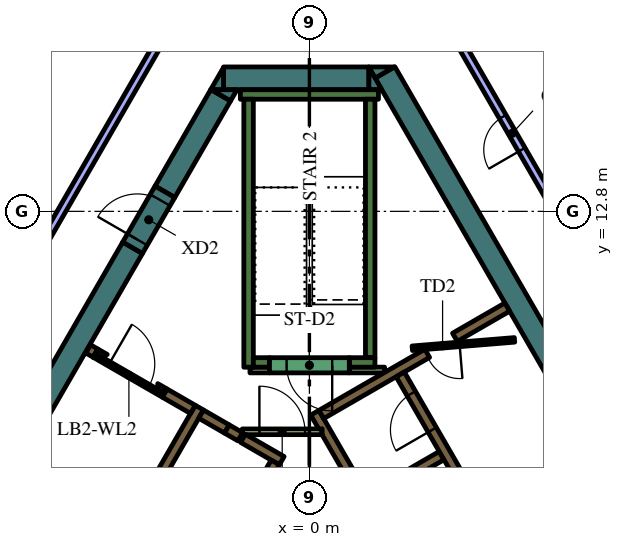
"""IFC4 building model, lengths in metres.
Left out: names, types, materials, properties, quantities, classifications, styles, units other than length and angle.
Written with IfcOpenShell. Run it as: python <this file> out.ifc"""

import sys

from ifc_helpers import new_model, si_unit, direction, frame, frame_2d, origin, place, context, subcontext, project, spatial, polyline, rectangle, outline, extrude, element, fill, save


model = new_model("IFC4")
c1 = context("Model", 3, precision=1e-05, world=origin(), true_north=direction((0.0, 1.0)))
c2 = subcontext(c1, "Body", "Model", "MODEL_VIEW")
j1 = project(units=[si_unit("LENGTHUNIT", "METRE"), si_unit("PLANEANGLEUNIT", "RADIAN")], contexts=[c1])
p1 = place(None, origin())
s1 = spatial("IfcSite", under=j1, at=p1, CompositionType="ELEMENT")
p2 = place(p1, origin())
s2 = spatial("IfcBuilding", under=s1, at=p2, CompositionType="ELEMENT")
p3 = place(p2, frame((0.0, 0.0, 292.2)))
s3 = spatial("IfcBuildingStorey", under=s2, at=p3, CompositionType="ELEMENT", Elevation=292.2)
p4 = place(p3, frame((1.989, 16.456, 0.0), z_axis=(0.0, 0.0, 1.0), x_axis=(0.49999102663, -0.8660305845, 0.0)))
e1 = element("IfcWall", 1, at=p4, inside=s3, PredefinedType="SOLIDWALL", context=c2, shape_type="SweptSolid", body=[
    extrude(rectangle(XDim=12.406, YDim=0.6, at=frame_2d((6.203, 0.0))), origin(), (0.0, 0.0, 1.0), 4.2),
])
p5 = place(p3, origin())
e2 = element("IfcWall", 2, at=p5, inside=s3, PredefinedType="SOLIDWALL", context=c2, shape_type="SweptSolid", body=[
    extrude(outline(polyline([(1.559, 16.6), (2.235, 16.6), (1.728, 16.307), (1.559, 16.6)])), origin(), (0.0, 0.0, 1.0), 4.2),
])
p6 = place(p3, frame((-2.258, 16.3, 0.0), z_axis=(0.0, 0.0, 1.0), x_axis=(1.0, 0.0, 0.0)))
e3 = element("IfcWall", 3, at=p6, inside=s3, PredefinedType="SOLIDWALL", context=c2, shape_type="SweptSolid", body=[
    extrude(rectangle(XDim=3.823, YDim=0.6, at=frame_2d((1.912, 0.0))), origin(), (0.0, 0.0, 1.0), 4.2),
])
e4 = element("IfcWall", 4, at=p5, inside=s3, PredefinedType="SOLIDWALL", context=c2, shape_type="SweptSolid", body=[
    extrude(outline(polyline([(1.905, 16.0), (1.567, 16.0), (1.567, 16.585), (1.905, 16.0)])), origin(), (0.0, 0.0, 1.0), 4.2),
])
e5 = element("IfcWall", 5, at=p5, inside=s3, PredefinedType="SOLIDWALL", context=c2, shape_type="SweptSolid", body=[
    extrude(outline(polyline([(-2.598, 16.0), (-2.26, 16.585), (-2.26, 16.0), (-2.598, 16.0)])), origin(), (0.0, 0.0, 1.0), 4.2),
])
p7 = place(p3, frame((-2.335, 15.855, 0.0), z_axis=(0.0, 0.0, 1.0), x_axis=(-0.499960127962, -0.866048422692, 0.0)))
e6 = element("IfcWall", 6, at=p7, inside=s3, PredefinedType="SOLIDWALL", context=c2, shape_type="SweptSolid", body=[
    extrude(rectangle(XDim=2.934, YDim=0.6, at=frame_2d((1.467, 0.0))), origin(), (0.0, 0.0, 1.0), 4.2),
])
e7 = element("IfcWall", 7, at=p5, inside=s3, PredefinedType="SOLIDWALL", context=c2, shape_type="SweptSolid", body=[
    extrude(outline(polyline([(-1.905, 16.0), (-2.074, 15.707), (-2.581, 16.0), (-1.905, 16.0)])), origin(), (0.0, 0.0, 1.0), 4.2),
])
e8 = element("IfcWall", 8, at=p5, inside=s3, PredefinedType="SOLIDWALL", context=c2, shape_type="SweptSolid", body=[
    extrude(outline(polyline([(-15.502, -6.35), (-4.912, 11.992), (-4.393, 11.692), (-10.815, 0.569), (-10.84, 0.583), (-10.84, 0.583), (-10.84, 0.583), (-10.965, 0.367), (-10.965, 0.367), (-10.965, 0.367), (-10.94, 0.352), (-11.033, 0.191), (-14.809, -6.35), (-15.156, -6.95), (-15.502, -6.35)])), origin(), (0.0, 0.0, 1.0), 4.2),
])
p8 = place(p3, frame((-1.817, 15.875, 0.0), z_axis=(0.0, 0.0, 1.0), x_axis=(1.0, 0.0, 0.0)))
e9 = element("IfcWall", 9, at=p8, inside=s3, PredefinedType="SOLIDWALL", context=c2, shape_type="SweptSolid", body=[
    extrude(rectangle(XDim=3.634, YDim=0.25, at=frame_2d((1.817, 0.0))), origin(), (0.0, 0.0, 1.0), 4.2),
])
p9 = place(p3, frame((1.6, 8.95, 0.0), z_axis=(0.0, 0.0, 1.0), x_axis=(0.0, 1.0, 0.0)))
e10 = element("IfcWall", 10, at=p9, inside=s3, PredefinedType="SOLIDWALL", context=c2, shape_type="SweptSolid", body=[
    extrude(rectangle(XDim=6.8, YDim=0.25, at=frame_2d((3.4, 0.0))), origin(), (0.0, 0.0, 1.0), 4.2),
])
p10 = place(p3, frame((1.05, 8.825, 0.0), z_axis=(0.0, 0.0, 1.0), x_axis=(1.0, 0.0, 0.0)))
e11 = element("IfcWall", 11, at=p10, inside=s3, PredefinedType="SOLIDWALL", context=c2, shape_type="SweptSolid", body=[
    extrude(rectangle(XDim=0.675, YDim=0.25, at=frame_2d((0.337, 0.0))), origin(), (0.0, 0.0, 1.0), 4.2),
])
p11 = place(p3, frame((-1.6, 8.7, 0.0), z_axis=(0.0, 0.0, 1.0), x_axis=(0.0, 1.0, 0.0)))
e12 = element("IfcWall", 12, at=p11, inside=s3, PredefinedType="SOLIDWALL", context=c2, shape_type="SweptSolid", body=[
    extrude(rectangle(XDim=7.05, YDim=0.25, at=frame_2d((3.525, 0.0))), origin(), (0.0, 0.0, 1.0), 4.2),
])
p12 = place(p3, frame((-1.475, 8.825, 0.0), z_axis=(0.0, 0.0, 1.0), x_axis=(1.0, 0.0, 0.0)))
e13 = element("IfcWall", 13, at=p12, inside=s3, PredefinedType="SOLIDWALL", context=c2, shape_type="SweptSolid", body=[
    extrude(rectangle(XDim=0.425, YDim=0.25, at=frame_2d((0.212, 0.0))), origin(), (0.0, 0.0, 1.0), 4.2),
])
e14 = element("IfcWall", 14, at=p5, inside=s3, PredefinedType="SOLIDWALL", context=c2, shape_type="SweptSolid", body=[
    extrude(outline(polyline([(0.332, 6.925), (0.335, 6.925), (0.335, 6.925), (0.335, 6.925), (0.335, 7.075), (0.335, 7.075), (0.335, 7.075), (0.245, 7.075), (0.035, 7.439), (0.252, 7.564), (0.377, 7.348), (1.512, 5.382), (1.637, 5.165), (2.221, 4.153), (2.771, 3.199), (2.896, 2.983), (3.138, 2.564), (4.031, 1.017), (4.156, 0.801), (5.292, -1.165), (5.417, -1.382), (6.073, -2.519), (6.552, -3.348), (6.677, -3.564), (6.46, -3.689), (0.332, 6.925)])), origin(), (0.0, 0.0, 1.0), 4.2),
])
p13 = place(p3, frame((3.1, 9.064, 0.0), z_axis=(0.0, 0.0, 1.0), x_axis=(-0.866030133475, -0.499991807846, 0.0)))
e15 = element("IfcWall", 15, at=p13, inside=s3, PredefinedType="SOLIDWALL", context=c2, shape_type="SweptSolid", body=[
    extrude(rectangle(XDim=3.217, YDim=0.25, at=frame_2d((1.608, 0.0))), origin(), (0.0, 0.0, 1.0), 4.2),
])
p14 = place(p3, frame((1.574, 5.274, 0.0), z_axis=(0.0, 0.0, 1.0), x_axis=(0.866028486751, 0.499994660107, 0.0)))
e16 = element("IfcWall", 16, at=p14, inside=s3, PredefinedType="SOLIDWALL", context=c2, shape_type="SweptSolid", body=[
    extrude(rectangle(XDim=2.2, YDim=0.25, at=frame_2d((1.1, 0.0))), origin(), (0.0, 0.0, 1.0), 4.2),
])
p15 = place(p3, frame((3.83, 9.486, 0.0), z_axis=(0.0, 0.0, 1.0), x_axis=(0.865986202621, 0.500067892261, 0.0)))
e17 = element("IfcWall", 17, at=p15, inside=s3, PredefinedType="SOLIDWALL", context=c2, shape_type="SweptSolid", body=[
    extrude(rectangle(XDim=1.591, YDim=0.25, at=frame_2d((0.795, 0.0))), origin(), (0.0, 0.0, 1.0), 4.2),
])
p16 = place(p3, frame((-8.06, -1.311, 0.0), z_axis=(0.0, 0.0, 1.0), x_axis=(0.50000273126, 0.866023826885, 0.0)))
e18 = element("IfcWall", 18, at=p16, inside=s3, PredefinedType="SOLIDWALL", context=c2, shape_type="SweptSolid", body=[
    extrude(rectangle(XDim=10.33, YDim=0.25, at=frame_2d((5.165, 0.0))), origin(), (0.0, 0.0, 1.0), 4.2),
])
p17 = place(p3, frame((-1.819, 6.87, 0.0), z_axis=(0.0, 0.0, 1.0), x_axis=(-0.866294599386, 0.499533449405, 0.0)))
e19 = element("IfcWall", 19, at=p17, inside=s3, PredefinedType="SOLIDWALL", context=c2, shape_type="SweptSolid", body=[
    extrude(rectangle(XDim=0.41, YDim=0.25, at=frame_2d((0.205, 0.0))), origin(), (0.0, 0.0, 1.0), 4.2),
])
p18 = place(p3, frame((-2.849, 7.465, 0.0), z_axis=(0.0, 0.0, 1.0), x_axis=(0.865955664968, -0.500120771724, 0.0)))
e20 = element("IfcWall", 20, at=p18, inside=s3, PredefinedType="SOLIDWALL", context=c2, shape_type="SweptSolid", body=[
    extrude(rectangle(XDim=0.778, YDim=0.25, at=frame_2d((0.389, 0.0))), origin(), (0.0, 0.0, 1.0), 4.2),
])
p19 = place(p3, frame((-0.728, 6.24, 0.0), z_axis=(0.0, 0.0, 1.0), x_axis=(-0.866002680491, 0.500039355833, 0.0)))
e21 = element("IfcWall", 21, at=p19, inside=s3, PredefinedType="SOLIDWALL", context=c2, shape_type="SweptSolid", body=[
    extrude(rectangle(XDim=1.178, YDim=0.25, at=frame_2d((0.589, 0.0))), origin(), (0.0, 0.0, 1.0), 4.2),
])
p20 = place(p3, frame((-5.629, 9.07, 0.0), z_axis=(0.0, 0.0, 1.0), x_axis=(-0.866185586049, 0.49972245349, 0.0)))
e22 = element("IfcWall", 22, at=p20, inside=s3, PredefinedType="SOLIDWALL", context=c2, shape_type="SweptSolid", body=[
    extrude(rectangle(XDim=0.22, YDim=0.25, at=frame_2d((0.11, 0.0))), origin(), (0.0, 0.0, 1.0), 4.2),
])
p21 = place(p3, frame((-3.809, 8.019, 0.0), z_axis=(0.0, 0.0, 1.0), x_axis=(0.866010229787, -0.500026281214, 0.0)))
e23 = element("IfcWall", 23, at=p21, inside=s3, PredefinedType="SOLIDWALL", context=c2, shape_type="SweptSolid", body=[
    extrude(rectangle(XDim=0.858, YDim=0.25, at=frame_2d((0.429, 0.0))), origin(), (0.0, 0.0, 1.0), 4.2),
])
e24 = element("IfcWall", 24, at=p5, inside=s3, PredefinedType="SOLIDWALL", context=c2, shape_type="SweptSolid", body=[
    extrude(outline(polyline([(-3.748, 8.128), (-3.813, 8.015), (-4.027, 8.139), (-4.017, 8.156), (-4.008, 8.173), (-4.0, 8.192), (-3.995, 8.21), (-3.991, 8.23), (-3.99, 8.25), (-3.99, 8.268), (-3.748, 8.128)])), origin(), (0.0, 0.0, 1.0), 4.2),
])
e25 = element("IfcWall", 25, at=p5, inside=s3, PredefinedType="SOLIDWALL", context=c2, shape_type="SweptSolid", body=[
    extrude(outline(polyline([(-5.689, 8.96), (-5.69, 8.961), (-5.565, 9.177), (-5.319, 9.035), (-5.335, 9.026), (-5.351, 9.015), (-5.366, 9.002), (-5.379, 8.988), (-5.392, 8.972), (-5.402, 8.956), (-5.412, 8.939), (-5.629, 9.064), (-5.629, 9.064), (-5.689, 8.96)])), origin(), (0.0, 0.0, 1.0), 4.2),
])
p22 = place(p3, frame((1.05, 8.625, 0.0), z_axis=(0.0, 0.0, 1.0), x_axis=(1.0, 0.0, 0.0)))
e26 = element("IfcWall", 26, at=p22, inside=s3, PredefinedType="PARTITIONING", context=c2, shape_type="SweptSolid", body=[
    extrude(rectangle(XDim=0.929, YDim=0.15, at=frame_2d((0.464, 0.0))), origin(), (0.0, 0.0, 1.0), 3.55),
])
p23 = place(p3, frame((-1.564, 8.625, 0.0), z_axis=(0.0, 0.0, 1.0), x_axis=(1.0, 0.0, 0.0)))
e27 = element("IfcWall", 27, at=p23, inside=s3, PredefinedType="PARTITIONING", context=c2, shape_type="SweptSolid", body=[
    extrude(rectangle(XDim=0.514, YDim=0.15, at=frame_2d((0.257, 0.0))), origin(), (0.0, 0.0, 1.0), 3.55),
])
p24 = place(p3, frame((8.565, -2.185, 0.0), z_axis=(0.0, 0.0, 1.0), x_axis=(-0.499997954832, 0.866026584559, 0.0)))
e28 = element("IfcWall", 28, at=p24, inside=s3, PredefinedType="SOLIDWALL", context=c2, shape_type="SweptSolid", body=[
    extrude(rectangle(XDim=12.35, YDim=0.25, at=frame_2d((6.175, 0.0))), origin(), (0.0, 0.0, 1.0), 4.2),
])
p25 = place(p24, frame((0.685, 0.0, 0.0)))
e29 = element("IfcOpeningElement", 29, at=p25, cuts=e28, PredefinedType="OPENING", context=c2, shape_type="SweptSolid", body=[
    extrude(rectangle(XDim=0.9, YDim=2.1, at=frame_2d((0.45, 1.05))), frame((0.0, 0.135, 0.0), z_axis=(0.0, -1.0, 0.0), x_axis=(1.0, 0.0, 0.0)), (0.0, 0.0, 1.0), 0.27),
])
p26 = place(p24, frame((3.105, 0.0, 0.0)))
e30 = element("IfcOpeningElement", 30, at=p26, cuts=e28, PredefinedType="OPENING", context=c2, shape_type="SweptSolid", body=[
    extrude(rectangle(XDim=1.1, YDim=2.1, at=frame_2d((0.55, 1.05))), frame((0.0, 0.135, 0.0), z_axis=(0.0, -1.0, 0.0), x_axis=(1.0, 0.0, 0.0)), (0.0, 0.0, 1.0), 0.27),
])
p27 = place(p24, frame((5.625, 0.0, 0.0)))
e31 = element("IfcOpeningElement", 31, at=p27, cuts=e28, PredefinedType="OPENING", context=c2, shape_type="SweptSolid", body=[
    extrude(rectangle(XDim=1.1, YDim=2.1, at=frame_2d((0.55, 1.05))), frame((0.0, 0.135, 0.0), z_axis=(0.0, -1.0, 0.0), x_axis=(1.0, 0.0, 0.0)), (0.0, 0.0, 1.0), 0.27),
])
p28 = place(p24, frame((8.145, 0.0, 0.0)))
e32 = element("IfcOpeningElement", 32, at=p28, cuts=e28, PredefinedType="OPENING", context=c2, shape_type="SweptSolid", body=[
    extrude(rectangle(XDim=1.1, YDim=2.1, at=frame_2d((0.55, 1.05))), frame((0.0, 0.135, 0.0), z_axis=(0.0, -1.0, 0.0), x_axis=(1.0, 0.0, 0.0)), (0.0, 0.0, 1.0), 0.27),
])
p29 = place(p24, frame((10.665, 0.0, 0.0)))
e33 = element("IfcOpeningElement", 33, at=p29, cuts=e28, PredefinedType="OPENING", context=c2, shape_type="SweptSolid", body=[
    extrude(rectangle(XDim=1.1, YDim=2.1, at=frame_2d((0.55, 1.05))), frame((0.0, 0.135, 0.0), z_axis=(0.0, -1.0, 0.0), x_axis=(1.0, 0.0, 0.0)), (0.0, 0.0, 1.0), 0.27),
])
p30 = place(p3, frame((-0.898, 6.194, 0.0), z_axis=(0.0, 0.0, 1.0), x_axis=(-0.499996202215, -0.866027596426, 0.0)))
e34 = element("IfcWall", 34, at=p30, inside=s3, PredefinedType="SOLIDWALL", context=c2, shape_type="SweptSolid", body=[
    extrude(rectangle(XDim=9.83, YDim=0.25, at=frame_2d((4.915, 0.0))), origin(), (0.0, 0.0, 1.0), 4.2),
])
p31 = place(p30, frame((0.585, 0.0, 0.0)))
e35 = element("IfcOpeningElement", 35, at=p31, cuts=e34, PredefinedType="OPENING", context=c2, shape_type="SweptSolid", body=[
    extrude(rectangle(XDim=1.1, YDim=2.1, at=frame_2d((0.55, 1.05))), frame((0.0, 0.135, 0.0), z_axis=(0.0, -1.0, 0.0), x_axis=(1.0, 0.0, 0.0)), (0.0, 0.0, 1.0), 0.27),
])
p32 = place(p30, frame((3.105, 0.0, 0.0)))
e36 = element("IfcOpeningElement", 36, at=p32, cuts=e34, PredefinedType="OPENING", context=c2, shape_type="SweptSolid", body=[
    extrude(rectangle(XDim=1.1, YDim=2.1, at=frame_2d((0.55, 1.05))), frame((0.0, 0.135, 0.0), z_axis=(0.0, -1.0, 0.0), x_axis=(1.0, 0.0, 0.0)), (0.0, 0.0, 1.0), 0.27),
])
p33 = place(p30, frame((5.625, 0.0, 0.0)))
e37 = element("IfcOpeningElement", 37, at=p33, cuts=e34, PredefinedType="OPENING", context=c2, shape_type="SweptSolid", body=[
    extrude(rectangle(XDim=1.1, YDim=2.1, at=frame_2d((0.55, 1.05))), frame((0.0, 0.135, 0.0), z_axis=(0.0, -1.0, 0.0), x_axis=(1.0, 0.0, 0.0)), (0.0, 0.0, 1.0), 0.27),
])
p34 = place(p30, frame((8.145, 0.0, 0.0)))
e38 = element("IfcOpeningElement", 38, at=p34, cuts=e34, PredefinedType="OPENING", context=c2, shape_type="SweptSolid", body=[
    extrude(rectangle(XDim=1.1, YDim=2.1, at=frame_2d((0.55, 1.05))), frame((0.0, 0.135, 0.0), z_axis=(0.0, -1.0, 0.0), x_axis=(1.0, 0.0, 0.0)), (0.0, 0.0, 1.0), 0.27),
])
p35 = place(p3, frame((1.05, 8.75, 0.0), z_axis=(0.0, 0.0, 1.0), x_axis=(-1.0, 0.0, 0.0)))
e39 = element("IfcWall", 39, at=p35, inside=s3, PredefinedType="SOLIDWALL", context=c2, shape_type="SweptSolid", body=[
    extrude(rectangle(XDim=2.1, YDim=0.4, at=frame_2d((1.05, 0.0))), origin(), (0.0, 0.0, 1.0), 4.2),
])
p36 = place(p35, frame((0.45, 0.0, 0.0)))
e40 = element("IfcOpeningElement", 40, at=p36, cuts=e39, PredefinedType="OPENING", context=c2, shape_type="SweptSolid", body=[
    extrude(rectangle(XDim=1.2, YDim=2.1, at=frame_2d((0.6, 1.05))), frame((0.0, 0.21, 0.0), z_axis=(0.0, -1.0, 0.0), x_axis=(1.0, 0.0, 0.0)), (0.0, 0.0, 1.0), 0.42),
])
p37 = place(p3, frame((5.398, 9.419, 0.0), z_axis=(0.0, 0.0, 1.0), x_axis=(-0.996653416376, -0.081743303248, 0.0)))
e41 = element("IfcWall", 41, at=p37, inside=s3, PredefinedType="PARTITIONING", context=c2, shape_type="SweptSolid", body=[
    extrude(rectangle(XDim=2.7, YDim=0.12, at=frame_2d((1.35, 0.0))), origin(), (0.0, 0.0, 1.0), 3.55),
])
p38 = place(p37, frame((1.45, 0.0, 0.0)))
e42 = element("IfcOpeningElement", 42, at=p38, cuts=e41, PredefinedType="OPENING", context=c2, shape_type="SweptSolid", body=[
    extrude(rectangle(XDim=0.9, YDim=2.1, at=frame_2d((0.45, 1.05))), frame((0.0, 0.07, 0.0), z_axis=(0.0, -1.0, 0.0), x_axis=(1.0, 0.0, 0.0)), (0.0, 0.0, 1.0), 0.14),
])
p39 = place(p3, frame((-1.765, 7.0, 0.0), z_axis=(0.0, 0.0, 1.0), x_axis=(1.0, 0.0, 0.0)))
e43 = element("IfcWall", 43, at=p39, inside=s3, PredefinedType="PARTITIONING", context=c2, shape_type="SweptSolid", body=[
    extrude(rectangle(XDim=2.1, YDim=0.15, at=frame_2d((1.05, 0.0))), origin(), (0.0, 0.0, 1.0), 3.55),
])
p40 = place(p39, frame((0.45, 0.0, 0.0)))
e44 = element("IfcOpeningElement", 44, at=p40, cuts=e43, PredefinedType="OPENING", context=c2, shape_type="SweptSolid", body=[
    extrude(rectangle(XDim=1.2, YDim=2.1, at=frame_2d((0.6, 1.05))), frame((0.0, 0.085, 0.0), z_axis=(0.0, -1.0, 0.0), x_axis=(1.0, 0.0, 0.0)), (0.0, 0.0, 1.0), 0.17),
])
p41 = place(p3, frame((-5.659, 9.012, 0.0), z_axis=(0.0, 0.0, 1.0), x_axis=(0.866009402589, -0.500027713859, 0.0)))
e45 = element("IfcWall", 45, at=p41, inside=s3, PredefinedType="PARTITIONING", context=c2, shape_type="SweptSolid", body=[
    extrude(rectangle(XDim=2.1, YDim=0.12, at=frame_2d((1.05, 0.0))), origin(), (0.0, 0.0, 1.0), 3.55),
])
p42 = place(p41, frame((0.45, 0.0, 0.0)))
e46 = element("IfcOpeningElement", 46, at=p42, cuts=e45, PredefinedType="OPENING", context=c2, shape_type="SweptSolid", body=[
    extrude(rectangle(XDim=1.2, YDim=2.1, at=frame_2d((0.6, 1.05))), frame((0.0, 0.07, 0.0), z_axis=(0.0, -1.0, 0.0), x_axis=(1.0, 0.0, 0.0)), (0.0, 0.0, 1.0), 0.14),
])
p43 = place(p3, frame((-4.652, 11.842, 0.0), z_axis=(0.0, 0.0, 1.0), x_axis=(0.500062241894, 0.865989465428, 0.0)))
e47 = element("IfcWall", 47, at=p43, inside=s3, PredefinedType="SOLIDWALL", context=c2, shape_type="SweptSolid", body=[
    extrude(rectangle(XDim=1.7, YDim=0.6, at=frame_2d((0.85, 0.0))), origin(), (0.0, 0.0, 1.0), 4.2),
])
p44 = place(p43, frame((0.25, 0.0, 0.0)))
e48 = element("IfcOpeningElement", 48, at=p44, cuts=e47, PredefinedType="OPENING", context=c2, shape_type="SweptSolid", body=[
    extrude(rectangle(XDim=1.2, YDim=2.1, at=frame_2d((0.6, 1.05))), frame((0.0, 0.31, 0.0), z_axis=(0.0, -1.0, 0.0), x_axis=(1.0, 0.0, 0.0)), (0.0, 0.0, 1.0), 0.62),
])
p45 = place(p3, frame((7.188, 11.65, 0.0), z_axis=(0.0, 0.0, 1.0), x_axis=(-0.499989634868, 0.866031388014, 0.0)))
e49 = element("IfcWall", 49, at=p45, inside=s3, PredefinedType="PARTITIONING", context=c2, shape_type="SweptSolid", body=[
    extrude(rectangle(XDim=7.303, YDim=0.2, at=frame_2d((3.652, 0.0))), origin(), (0.0, 0.0, 1.0), 3.55),
])
p46 = place(p45, frame((3.2, 0.0, 0.0)))
e50 = element("IfcOpeningElement", 50, at=p46, cuts=e49, PredefinedType="OPENING", context=c2, shape_type="SweptSolid", body=[
    extrude(rectangle(XDim=1.0, YDim=2.1, at=frame_2d((0.5, 1.05))), frame((0.0, 0.11, 0.0), z_axis=(0.0, -1.0, 0.0), x_axis=(1.0, 0.0, 0.0)), (0.0, 0.0, 1.0), 0.22),
])
p47 = place(p3, frame((-7.962, 15.8, 0.0), z_axis=(0.0, 0.0, 1.0), x_axis=(0.599541489613, 0.800343677574, 0.0)))
e51 = element("IfcWall", 51, at=p47, inside=s3, PredefinedType="PARTITIONING", context=c2, shape_type="SweptSolid", body=[
    extrude(rectangle(XDim=4.942, YDim=0.15, at=frame_2d((2.471, 0.0))), origin(), (0.0, 0.0, 1.0), 3.55),
])
p48 = place(p47, frame((2.042, 0.0, 0.0)))
e52 = element("IfcOpeningElement", 52, at=p48, cuts=e51, PredefinedType="OPENING", context=c2, shape_type="SweptSolid", body=[
    extrude(rectangle(XDim=0.9, YDim=2.1, at=frame_2d((0.45, 1.05))), frame((0.0, 0.085, 0.0), z_axis=(0.0, -1.0, 0.0), x_axis=(1.0, 0.0, 0.0)), (0.0, 0.0, 1.0), 0.17),
])
p49 = place(p3, frame((-3.306, 18.374, 0.0), z_axis=(0.0, 0.0, 1.0), x_axis=(-0.499999798456, -0.866025520146, 0.0)))
e53 = element("IfcWall", 53, at=p49, inside=s3, PredefinedType="PARTITIONING", context=c2, shape_type="SweptSolid", body=[
    extrude(rectangle(XDim=8.229, YDim=0.2, at=frame_2d((4.115, 0.0))), origin(), (0.0, 0.0, 1.0), 3.55),
])
p50 = place(p29, origin())
e54 = element("IfcDoor", 54, at=p50, inside=s3, OperationType="DOUBLE_DOOR_SLIDING", PredefinedType="DOOR", context=c2, shape_type="SweptSolid", body=[
    extrude(rectangle(XDim=1.1, YDim=2.1, at=frame_2d((0.55, 1.05))), frame((0.0, 0.025, 0.0), z_axis=(0.0, -1.0, 0.0), x_axis=(1.0, 0.0, 0.0)), (0.0, 0.0, 1.0), 0.05),
])
fill(e33, e54)
p51 = place(p36, origin())
e55 = element("IfcDoor", 55, at=p51, inside=s3, OperationType="SINGLE_SWING_LEFT", PredefinedType="DOOR", context=c2, shape_type="SweptSolid", body=[
    extrude(rectangle(XDim=1.2, YDim=2.1, at=frame_2d((0.6, 1.05))), frame((0.0, 0.025, 0.0), z_axis=(0.0, -1.0, 0.0), x_axis=(1.0, 0.0, 0.0)), (0.0, 0.0, 1.0), 0.05),
])
fill(e40, e55)
p52 = place(p38, origin())
e56 = element("IfcDoor", 56, at=p52, inside=s3, OperationType="SINGLE_SWING_LEFT", PredefinedType="DOOR", context=c2, shape_type="SweptSolid", body=[
    extrude(rectangle(XDim=0.9, YDim=2.1, at=frame_2d((0.45, 1.05))), frame((0.0, 0.025, 0.0), z_axis=(0.0, -1.0, 0.0), x_axis=(1.0, 0.0, 0.0)), (0.0, 0.0, 1.0), 0.05),
])
fill(e42, e56)
p53 = place(p40, origin())
e57 = element("IfcDoor", 57, at=p53, inside=s3, OperationType="SINGLE_SWING_LEFT", PredefinedType="DOOR", context=c2, shape_type="SweptSolid", body=[
    extrude(rectangle(XDim=1.2, YDim=2.1, at=frame_2d((0.6, 1.05))), frame((0.0, 0.025, 0.0), z_axis=(0.0, -1.0, 0.0), x_axis=(1.0, 0.0, 0.0)), (0.0, 0.0, 1.0), 0.05),
])
fill(e44, e57)
p54 = place(p42, origin())
e58 = element("IfcDoor", 58, at=p54, inside=s3, OperationType="SINGLE_SWING_LEFT", PredefinedType="DOOR", context=c2, shape_type="SweptSolid", body=[
    extrude(rectangle(XDim=1.2, YDim=2.1, at=frame_2d((0.6, 1.05))), frame((0.0, 0.025, 0.0), z_axis=(0.0, -1.0, 0.0), x_axis=(1.0, 0.0, 0.0)), (0.0, 0.0, 1.0), 0.05),
])
fill(e46, e58)
p55 = place(p44, origin())
e59 = element("IfcDoor", 59, at=p55, inside=s3, OperationType="SINGLE_SWING_LEFT", PredefinedType="DOOR", context=c2, shape_type="SweptSolid", body=[
    extrude(rectangle(XDim=1.2, YDim=2.1, at=frame_2d((0.6, 1.05))), frame((0.0, 0.025, 0.0), z_axis=(0.0, -1.0, 0.0), x_axis=(1.0, 0.0, 0.0)), (0.0, 0.0, 1.0), 0.05),
])
fill(e48, e59)
p56 = place(p46, origin())
e60 = element("IfcDoor", 60, at=p56, inside=s3, OperationType="SINGLE_SWING_RIGHT", PredefinedType="DOOR", context=c2, shape_type="SweptSolid", body=[
    extrude(rectangle(XDim=1.0, YDim=2.1, at=frame_2d((0.5, 1.05))), frame((0.0, 0.025, 0.0), z_axis=(0.0, -1.0, 0.0), x_axis=(1.0, 0.0, 0.0)), (0.0, 0.0, 1.0), 0.05),
])
fill(e50, e60)
save(model, sys.argv[1])
